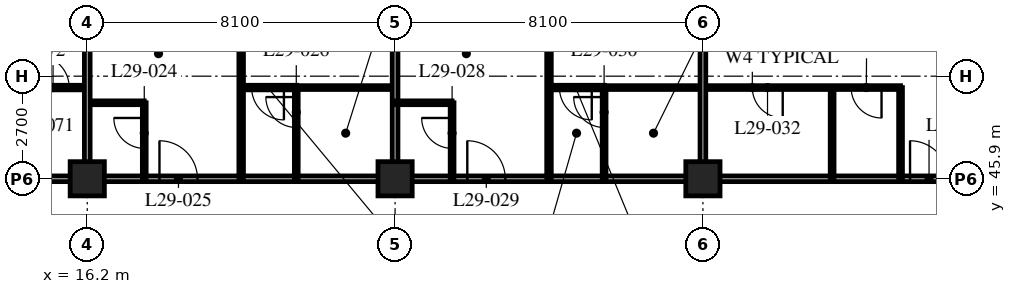
"""IFC4 building model, lengths in metres.
Left out: names, types, materials, properties, quantities, classifications, styles, units other than length and angle.
Written with IfcOpenShell. Run it as: python <this file> out.ifc"""

import sys

from ifc_helpers import new_model, si_unit, direction, frame, frame_2d, origin, origin_2d, place, context, subcontext, project, spatial, rectangle, hollow_rectangle, extrude, element, fill, save


model = new_model("IFC4")
c1 = context("Model", 3, precision=1e-05, world=origin(), true_north=direction((0.0, 1.0)))
c2 = subcontext(c1, "Body", "Model", "MODEL_VIEW")
j1 = project(units=[si_unit("LENGTHUNIT", "METRE"), si_unit("PLANEANGLEUNIT", "RADIAN")], contexts=[c1])
p1 = place(None, origin())
s1 = spatial("IfcSite", under=j1, at=p1, CompositionType="ELEMENT")
p2 = place(p1, origin())
s2 = spatial("IfcBuilding", under=s1, at=p2, CompositionType="ELEMENT")
p3 = place(p2, frame((0.0, 0.0, 117.0)))
s3 = spatial("IfcBuildingStorey", under=s2, at=p3, CompositionType="ELEMENT", Elevation=117.0)
for number, where, z_axis, x_axis in (
    (1, (16.2, 45.9, 0.0), (0.0, 0.0, 1.0), (1.0, 0.0, 0.0)),
    (2, (24.3, 45.9, 0.0), (0.0, 0.0, 1.0), (1.0, 0.0, 0.0)),
    (3, (32.4, 45.9, 0.0), (0.0, 0.0, 1.0), (1.0, 0.0, 0.0)),
):
    element("IfcColumn", number, at=place(p3, frame(where, z_axis=z_axis, x_axis=x_axis)), inside=s3, PredefinedType="COLUMN", context=c2, shape_type="SweptSolid", body=[
        extrude(hollow_rectangle(XDim=0.9, YDim=0.9, WallThickness=0.09, at=origin_2d()), origin(), (0.0, 0.0, 1.0), 3.4),
    ])
p4 = place(p3, frame((12.15, 45.9, 0.0), z_axis=(0.0, 0.0, 1.0), x_axis=(1.0, 0.0, 0.0)))
e4 = element("IfcWall", 4, at=p4, inside=s3, PredefinedType="PARTITIONING", context=c2, shape_type="SweptSolid", body=[
    extrude(rectangle(XDim=32.4, YDim=0.15, at=frame_2d((16.2, 0.0))), origin(), (0.0, 0.0, 1.0), 2.578),
])
p5 = place(p4, frame((5.95, 0.0, 0.0)))
e5 = element("IfcOpeningElement", 5, at=p5, cuts=e4, PredefinedType="OPENING", context=c2, shape_type="SweptSolid", body=[
    extrude(rectangle(XDim=1.0, YDim=2.1, at=frame_2d((0.5, 1.05))), frame((0.0, 0.085, 0.0), z_axis=(0.0, -1.0, 0.0), x_axis=(1.0, 0.0, 0.0)), (0.0, 0.0, 1.0), 0.17),
])
p6 = place(p4, frame((14.05, 0.0, 0.0)))
e6 = element("IfcOpeningElement", 6, at=p6, cuts=e4, PredefinedType="OPENING", context=c2, shape_type="SweptSolid", body=[
    extrude(rectangle(XDim=1.0, YDim=2.1, at=frame_2d((0.5, 1.05))), frame((0.0, 0.085, 0.0), z_axis=(0.0, -1.0, 0.0), x_axis=(1.0, 0.0, 0.0)), (0.0, 0.0, 1.0), 0.17),
])
p7 = place(p4, frame((25.7, 0.0, 0.0)))
e7 = element("IfcOpeningElement", 7, at=p7, cuts=e4, PredefinedType="OPENING", context=c2, shape_type="SweptSolid", body=[
    extrude(rectangle(XDim=1.0, YDim=2.1, at=frame_2d((0.5, 1.05))), frame((0.0, 0.085, 0.0), z_axis=(0.0, -1.0, 0.0), x_axis=(1.0, 0.0, 0.0)), (0.0, 0.0, 1.0), 0.17),
])
p8 = place(p4, frame((29.875, 0.0, 0.0)))
e8 = element("IfcOpeningElement", 8, at=p8, cuts=e4, PredefinedType="OPENING", context=c2, shape_type="SweptSolid", body=[
    extrude(rectangle(XDim=1.0, YDim=2.1, at=frame_2d((0.5, 1.05))), frame((0.0, 0.085, 0.0), z_axis=(0.0, -1.0, 0.0), x_axis=(1.0, 0.0, 0.0)), (0.0, 0.0, 1.0), 0.17),
])
p9 = place(p4, frame((1.525, 0.0, 0.0)))
e9 = element("IfcOpeningElement", 9, at=p9, cuts=e4, PredefinedType="OPENING", context=c2, shape_type="SweptSolid", body=[
    extrude(rectangle(XDim=1.0, YDim=2.1, at=frame_2d((0.5, 1.05))), frame((0.0, 0.085, 0.0), z_axis=(0.0, -1.0, 0.0), x_axis=(1.0, 0.0, 0.0)), (0.0, 0.0, 1.0), 0.17),
])
p10 = place(p3, frame((16.2, 47.9, 0.0), z_axis=(0.0, 0.0, 1.0), x_axis=(1.0, 0.0, 0.0)))
e10 = element("IfcWall", 10, at=p10, inside=s3, PredefinedType="PARTITIONING", context=c2, shape_type="SweptSolid", body=[
    extrude(rectangle(XDim=1.5, YDim=0.1, at=frame_2d((0.75, 0.0))), origin(), (0.0, 0.0, 1.0), 3.19),
])
p11 = place(p3, frame((17.7, 45.9, 0.0), z_axis=(0.0, 0.0, 1.0), x_axis=(0.0, 1.0, 0.0)))
e11 = element("IfcWall", 11, at=p11, inside=s3, PredefinedType="PARTITIONING", context=c2, shape_type="SweptSolid", body=[
    extrude(rectangle(XDim=2.0, YDim=0.1, at=frame_2d((1.0, 0.0))), origin(), (0.0, 0.0, 1.0), 3.19),
])
p12 = place(p11, frame((0.8, 0.0, 0.0)))
e12 = element("IfcOpeningElement", 12, at=p12, cuts=e11, PredefinedType="OPENING", context=c2, shape_type="SweptSolid", body=[
    extrude(rectangle(XDim=0.8, YDim=2.1, at=frame_2d((0.4, 1.05))), frame((0.0, 0.06, 0.0), z_axis=(0.0, -1.0, 0.0), x_axis=(1.0, 0.0, 0.0)), (0.0, 0.0, 1.0), 0.12),
])
p13 = place(p3, frame((21.7, 48.3, 0.0), z_axis=(0.0, 0.0, 1.0), x_axis=(1.0, 0.0, 0.0)))
e13 = element("IfcWall", 13, at=p13, inside=s3, PredefinedType="PARTITIONING", context=c2, shape_type="SweptSolid", body=[
    extrude(rectangle(XDim=2.6, YDim=0.1, at=frame_2d((1.3, 0.0))), origin(), (0.0, 0.0, 1.0), 3.19),
])
p14 = place(p3, frame((21.7, 45.9, 0.0), z_axis=(0.0, 0.0, 1.0), x_axis=(0.0, 1.0, 0.0)))
e14 = element("IfcWall", 14, at=p14, inside=s3, PredefinedType="PARTITIONING", context=c2, shape_type="SweptSolid", body=[
    extrude(rectangle(XDim=2.4, YDim=0.1, at=frame_2d((1.2, 0.0))), origin(), (0.0, 0.0, 1.0), 3.19),
])
p15 = place(p14, frame((1.35, 0.0, 0.0)))
e15 = element("IfcOpeningElement", 15, at=p15, cuts=e14, PredefinedType="OPENING", context=c2, shape_type="SweptSolid", body=[
    extrude(rectangle(XDim=0.8, YDim=2.1, at=frame_2d((0.4, 1.05))), frame((0.0, 0.06, 0.0), z_axis=(0.0, -1.0, 0.0), x_axis=(1.0, 0.0, 0.0)), (0.0, 0.0, 1.0), 0.12),
])
p16 = place(p3, frame((20.25, 45.9, 0.0), z_axis=(0.0, 0.0, 1.0), x_axis=(0.0, 1.0, 0.0)))
e16 = element("IfcWall", 16, at=p16, inside=s3, PredefinedType="PARTITIONING", context=c2, shape_type="SweptSolid", body=[
    extrude(rectangle(XDim=7.8, YDim=0.12, at=frame_2d((3.9, 0.0))), origin(), (0.0, 0.0, 1.0), 3.19),
])
p17 = place(p16, frame((4.825, 0.0, 0.0)))
e17 = element("IfcOpeningElement", 17, at=p17, cuts=e16, PredefinedType="OPENING", context=c2, shape_type="SweptSolid", body=[
    extrude(rectangle(XDim=0.85, YDim=2.1, at=frame_2d((0.425, 1.05))), frame((0.0, 0.07, 0.0), z_axis=(0.0, -1.0, 0.0), x_axis=(1.0, 0.0, 0.0)), (0.0, 0.0, 1.0), 0.14),
])
p18 = place(p3, frame((24.3, 45.9, 0.0), z_axis=(0.0, 0.0, 1.0), x_axis=(0.0, 1.0, 0.0)))
e18 = element("IfcWall", 18, at=p18, inside=s3, PredefinedType="PARTITIONING", context=c2, shape_type="SweptSolid", body=[
    extrude(rectangle(XDim=7.8, YDim=0.15, at=frame_2d((3.9, 0.0))), origin(), (0.0, 0.0, 1.0), 2.578),
])
p19 = place(p3, frame((24.3, 47.9, 0.0), z_axis=(0.0, 0.0, 1.0), x_axis=(1.0, 0.0, 0.0)))
e19 = element("IfcWall", 19, at=p19, inside=s3, PredefinedType="PARTITIONING", context=c2, shape_type="SweptSolid", body=[
    extrude(rectangle(XDim=1.5, YDim=0.1, at=frame_2d((0.75, 0.0))), origin(), (0.0, 0.0, 1.0), 3.19),
])
p20 = place(p3, frame((25.8, 45.9, 0.0), z_axis=(0.0, 0.0, 1.0), x_axis=(0.0, 1.0, 0.0)))
e20 = element("IfcWall", 20, at=p20, inside=s3, PredefinedType="PARTITIONING", context=c2, shape_type="SweptSolid", body=[
    extrude(rectangle(XDim=2.0, YDim=0.1, at=frame_2d((1.0, 0.0))), origin(), (0.0, 0.0, 1.0), 3.19),
])
p21 = place(p20, frame((0.8, 0.0, 0.0)))
e21 = element("IfcOpeningElement", 21, at=p21, cuts=e20, PredefinedType="OPENING", context=c2, shape_type="SweptSolid", body=[
    extrude(rectangle(XDim=0.8, YDim=2.1, at=frame_2d((0.4, 1.05))), frame((0.0, 0.06, 0.0), z_axis=(0.0, -1.0, 0.0), x_axis=(1.0, 0.0, 0.0)), (0.0, 0.0, 1.0), 0.12),
])
p22 = place(p3, frame((29.8, 48.3, 0.0), z_axis=(0.0, 0.0, 1.0), x_axis=(1.0, 0.0, 0.0)))
e22 = element("IfcWall", 22, at=p22, inside=s3, PredefinedType="PARTITIONING", context=c2, shape_type="SweptSolid", body=[
    extrude(rectangle(XDim=7.8, YDim=0.1, at=frame_2d((3.9, 0.0))), origin(), (0.0, 0.0, 1.0), 3.19),
])
p23 = place(p22, frame((3.9, 0.0, 0.0)))
e23 = element("IfcOpeningElement", 23, at=p23, cuts=e22, PredefinedType="OPENING", context=c2, shape_type="SweptSolid", body=[
    extrude(rectangle(XDim=0.8, YDim=2.1, at=frame_2d((0.4, 1.05))), frame((0.0, 0.06, 0.0), z_axis=(0.0, -1.0, 0.0), x_axis=(1.0, 0.0, 0.0)), (0.0, 0.0, 1.0), 0.12),
])
p24 = place(p22, frame((6.5, 0.0, 0.0)))
e24 = element("IfcOpeningElement", 24, at=p24, cuts=e22, PredefinedType="OPENING", context=c2, shape_type="SweptSolid", body=[
    extrude(rectangle(XDim=0.8, YDim=2.1, at=frame_2d((0.4, 1.05))), frame((0.0, 0.06, 0.0), z_axis=(0.0, -1.0, 0.0), x_axis=(1.0, 0.0, 0.0)), (0.0, 0.0, 1.0), 0.12),
])
p25 = place(p3, frame((29.8, 45.9, 0.0), z_axis=(0.0, 0.0, 1.0), x_axis=(0.0, 1.0, 0.0)))
e25 = element("IfcWall", 25, at=p25, inside=s3, PredefinedType="PARTITIONING", context=c2, shape_type="SweptSolid", body=[
    extrude(rectangle(XDim=2.4, YDim=0.1, at=frame_2d((1.2, 0.0))), origin(), (0.0, 0.0, 1.0), 3.19),
])
p26 = place(p25, frame((1.35, 0.0, 0.0)))
e26 = element("IfcOpeningElement", 26, at=p26, cuts=e25, PredefinedType="OPENING", context=c2, shape_type="SweptSolid", body=[
    extrude(rectangle(XDim=0.8, YDim=2.1, at=frame_2d((0.4, 1.05))), frame((0.0, 0.06, 0.0), z_axis=(0.0, -1.0, 0.0), x_axis=(1.0, 0.0, 0.0)), (0.0, 0.0, 1.0), 0.12),
])
p27 = place(p3, frame((28.35, 45.9, 0.0), z_axis=(0.0, 0.0, 1.0), x_axis=(0.0, 1.0, 0.0)))
e27 = element("IfcWall", 27, at=p27, inside=s3, PredefinedType="PARTITIONING", context=c2, shape_type="SweptSolid", body=[
    extrude(rectangle(XDim=7.8, YDim=0.12, at=frame_2d((3.9, 0.0))), origin(), (0.0, 0.0, 1.0), 3.19),
])
p28 = place(p27, frame((4.825, 0.0, 0.0)))
e28 = element("IfcOpeningElement", 28, at=p28, cuts=e27, PredefinedType="OPENING", context=c2, shape_type="SweptSolid", body=[
    extrude(rectangle(XDim=0.85, YDim=2.1, at=frame_2d((0.425, 1.05))), frame((0.0, 0.07, 0.0), z_axis=(0.0, -1.0, 0.0), x_axis=(1.0, 0.0, 0.0)), (0.0, 0.0, 1.0), 0.14),
])
p29 = place(p3, frame((32.4, 45.9, 0.0), z_axis=(0.0, 0.0, 1.0), x_axis=(0.0, 1.0, 0.0)))
e29 = element("IfcWall", 29, at=p29, inside=s3, PredefinedType="PARTITIONING", context=c2, shape_type="SweptSolid", body=[
    extrude(rectangle(XDim=7.8, YDim=0.15, at=frame_2d((3.9, 0.0))), origin(), (0.0, 0.0, 1.0), 2.578),
])
for number, where, z_axis, x_axis in (
    (30, (35.8, 45.9, 0.0), (0.0, 0.0, 1.0), (0.0, 1.0, 0.0)),
    (31, (37.6, 45.9, 0.0), (0.0, 0.0, 1.0), (0.0, 1.0, 0.0)),
):
    element("IfcWall", number, at=place(p3, frame(where, z_axis=z_axis, x_axis=x_axis)), inside=s3, PredefinedType="PARTITIONING", context=c2, shape_type="SweptSolid", body=[
        extrude(rectangle(XDim=2.4, YDim=0.1, at=frame_2d((1.2, 0.0))), origin(), (0.0, 0.0, 1.0), 3.19),
    ])
p30 = place(p3, frame((8.15, 48.3, 0.0), z_axis=(0.0, 0.0, 1.0), x_axis=(1.0, 0.0, 0.0)))
e32 = element("IfcWall", 32, at=p30, inside=s3, PredefinedType="PARTITIONING", context=c2, shape_type="SweptSolid", body=[
    extrude(rectangle(XDim=8.05, YDim=0.12, at=frame_2d((4.025, 0.0))), origin(), (0.0, 0.0, 1.0), 3.19),
])
p31 = place(p30, frame((6.725, 0.0, 0.0)))
e33 = element("IfcOpeningElement", 33, at=p31, cuts=e32, PredefinedType="OPENING", context=c2, shape_type="SweptSolid", body=[
    extrude(rectangle(XDim=0.85, YDim=2.1, at=frame_2d((0.425, 1.05))), frame((0.0, 0.07, 0.0), z_axis=(0.0, -1.0, 0.0), x_axis=(1.0, 0.0, 0.0)), (0.0, 0.0, 1.0), 0.14),
])
p32 = place(p30, frame((2.875, 0.0, 0.0)))
e34 = element("IfcOpeningElement", 34, at=p32, cuts=e32, PredefinedType="OPENING", context=c2, shape_type="SweptSolid", body=[
    extrude(rectangle(XDim=0.85, YDim=2.1, at=frame_2d((0.425, 1.05))), frame((0.0, 0.07, 0.0), z_axis=(0.0, -1.0, 0.0), x_axis=(1.0, 0.0, 0.0)), (0.0, 0.0, 1.0), 0.14),
])
p33 = place(p3, frame((16.2, 45.9, 0.0), z_axis=(0.0, 0.0, 1.0), x_axis=(0.0, 1.0, 0.0)))
e35 = element("IfcWall", 35, at=p33, inside=s3, PredefinedType="PARTITIONING", context=c2, shape_type="SweptSolid", body=[
    extrude(rectangle(XDim=7.8, YDim=0.15, at=frame_2d((3.9, 0.0))), origin(), (0.0, 0.0, 1.0), 2.578),
])
p34 = place(p3, frame((20.25, 48.3, 0.0), z_axis=(0.0, 0.0, 1.0), x_axis=(1.0, 0.0, 0.0)))
e36 = element("IfcWall", 36, at=p34, inside=s3, PredefinedType="PARTITIONING", context=c2, shape_type="SweptSolid", body=[
    extrude(rectangle(XDim=1.46, YDim=0.12, at=frame_2d((0.73, 0.0))), origin(), (0.0, 0.0, 1.0), 3.19),
])
p35 = place(p34, frame((0.275, 0.0, 0.0)))
e37 = element("IfcOpeningElement", 37, at=p35, cuts=e36, PredefinedType="OPENING", context=c2, shape_type="SweptSolid", body=[
    extrude(rectangle(XDim=0.85, YDim=2.1, at=frame_2d((0.425, 1.05))), frame((0.0, 0.07, 0.0), z_axis=(0.0, -1.0, 0.0), x_axis=(1.0, 0.0, 0.0)), (0.0, 0.0, 1.0), 0.14),
])
p36 = place(p3, frame((28.35, 48.3, 0.0), z_axis=(0.0, 0.0, 1.0), x_axis=(1.0, 0.0, 0.0)))
e38 = element("IfcWall", 38, at=p36, inside=s3, PredefinedType="PARTITIONING", context=c2, shape_type="SweptSolid", body=[
    extrude(rectangle(XDim=1.46, YDim=0.12, at=frame_2d((0.73, 0.0))), origin(), (0.0, 0.0, 1.0), 3.19),
])
p37 = place(p36, frame((0.275, 0.0, 0.0)))
e39 = element("IfcOpeningElement", 39, at=p37, cuts=e38, PredefinedType="OPENING", context=c2, shape_type="SweptSolid", body=[
    extrude(rectangle(XDim=0.85, YDim=2.1, at=frame_2d((0.425, 1.05))), frame((0.0, 0.07, 0.0), z_axis=(0.0, -1.0, 0.0), x_axis=(1.0, 0.0, 0.0)), (0.0, 0.0, 1.0), 0.14),
])
p38 = place(p12, origin())
e40 = element("IfcDoor", 40, at=p38, inside=s3, OperationType="SINGLE_SWING_RIGHT", PredefinedType="DOOR", context=c2, shape_type="SweptSolid", body=[
    extrude(rectangle(XDim=0.8, YDim=2.1, at=frame_2d((0.4, 1.05))), frame((0.0, 0.025, 0.0), z_axis=(0.0, -1.0, 0.0), x_axis=(1.0, 0.0, 0.0)), (0.0, 0.0, 1.0), 0.05),
])
fill(e12, e40)
p39 = place(p5, origin())
e41 = element("IfcDoor", 41, at=p39, inside=s3, OperationType="SINGLE_SWING_LEFT", PredefinedType="DOOR", context=c2, shape_type="SweptSolid", body=[
    extrude(rectangle(XDim=1.0, YDim=2.1, at=frame_2d((0.5, 1.05))), frame((0.0, 0.025, 0.0), z_axis=(0.0, -1.0, 0.0), x_axis=(1.0, 0.0, 0.0)), (0.0, 0.0, 1.0), 0.05),
])
fill(e5, e41)
p40 = place(p15, origin())
e42 = element("IfcDoor", 42, at=p40, inside=s3, OperationType="SINGLE_SWING_RIGHT", PredefinedType="DOOR", context=c2, shape_type="SweptSolid", body=[
    extrude(rectangle(XDim=0.8, YDim=2.1, at=frame_2d((0.4, 1.05))), frame((0.0, 0.025, 0.0), z_axis=(0.0, -1.0, 0.0), x_axis=(1.0, 0.0, 0.0)), (0.0, 0.0, 1.0), 0.05),
])
fill(e15, e42)
p41 = place(p21, origin())
e43 = element("IfcDoor", 43, at=p41, inside=s3, OperationType="SINGLE_SWING_RIGHT", PredefinedType="DOOR", context=c2, shape_type="SweptSolid", body=[
    extrude(rectangle(XDim=0.8, YDim=2.1, at=frame_2d((0.4, 1.05))), frame((0.0, 0.025, 0.0), z_axis=(0.0, -1.0, 0.0), x_axis=(1.0, 0.0, 0.0)), (0.0, 0.0, 1.0), 0.05),
])
fill(e21, e43)
p42 = place(p6, origin())
e44 = element("IfcDoor", 44, at=p42, inside=s3, OperationType="SINGLE_SWING_LEFT", PredefinedType="DOOR", context=c2, shape_type="SweptSolid", body=[
    extrude(rectangle(XDim=1.0, YDim=2.1, at=frame_2d((0.5, 1.05))), frame((0.0, 0.025, 0.0), z_axis=(0.0, -1.0, 0.0), x_axis=(1.0, 0.0, 0.0)), (0.0, 0.0, 1.0), 0.05),
])
fill(e6, e44)
p43 = place(p26, origin())
e45 = element("IfcDoor", 45, at=p43, inside=s3, OperationType="SINGLE_SWING_RIGHT", PredefinedType="DOOR", context=c2, shape_type="SweptSolid", body=[
    extrude(rectangle(XDim=0.8, YDim=2.1, at=frame_2d((0.4, 1.05))), frame((0.0, 0.025, 0.0), z_axis=(0.0, -1.0, 0.0), x_axis=(1.0, 0.0, 0.0)), (0.0, 0.0, 1.0), 0.05),
])
fill(e26, e45)
p44 = place(p23, origin())
e46 = element("IfcDoor", 46, at=p44, inside=s3, OperationType="SINGLE_SWING_LEFT", PredefinedType="DOOR", context=c2, shape_type="SweptSolid", body=[
    extrude(rectangle(XDim=0.8, YDim=2.1, at=frame_2d((0.4, 1.05))), frame((0.0, 0.025, 0.0), z_axis=(0.0, -1.0, 0.0), x_axis=(1.0, 0.0, 0.0)), (0.0, 0.0, 1.0), 0.05),
])
fill(e23, e46)
p45 = place(p24, origin())
e47 = element("IfcDoor", 47, at=p45, inside=s3, OperationType="SINGLE_SWING_LEFT", PredefinedType="DOOR", context=c2, shape_type="SweptSolid", body=[
    extrude(rectangle(XDim=0.8, YDim=2.1, at=frame_2d((0.4, 1.05))), frame((0.0, 0.025, 0.0), z_axis=(0.0, -1.0, 0.0), x_axis=(1.0, 0.0, 0.0)), (0.0, 0.0, 1.0), 0.05),
])
fill(e24, e47)
p46 = place(p7, origin())
e48 = element("IfcDoor", 48, at=p46, inside=s3, OperationType="SINGLE_SWING_LEFT", PredefinedType="DOOR", context=c2, shape_type="SweptSolid", body=[
    extrude(rectangle(XDim=1.0, YDim=2.1, at=frame_2d((0.5, 1.05))), frame((0.0, 0.025, 0.0), z_axis=(0.0, -1.0, 0.0), x_axis=(1.0, 0.0, 0.0)), (0.0, 0.0, 1.0), 0.05),
])
fill(e7, e48)
p47 = place(p31, origin())
e49 = element("IfcDoor", 49, at=p47, inside=s3, OperationType="SINGLE_SWING_LEFT", PredefinedType="DOOR", context=c2, shape_type="SweptSolid", body=[
    extrude(rectangle(XDim=0.85, YDim=2.1, at=frame_2d((0.425, 1.05))), frame((0.0, 0.025, 0.0), z_axis=(0.0, -1.0, 0.0), x_axis=(1.0, 0.0, 0.0)), (0.0, 0.0, 1.0), 0.05),
])
fill(e33, e49)
p48 = place(p35, origin())
e50 = element("IfcDoor", 50, at=p48, inside=s3, OperationType="SINGLE_SWING_LEFT", PredefinedType="DOOR", context=c2, shape_type="SweptSolid", body=[
    extrude(rectangle(XDim=0.85, YDim=2.1, at=frame_2d((0.425, 1.05))), frame((0.0, 0.025, 0.0), z_axis=(0.0, -1.0, 0.0), x_axis=(1.0, 0.0, 0.0)), (0.0, 0.0, 1.0), 0.05),
])
fill(e37, e50)
p49 = place(p37, origin())
e51 = element("IfcDoor", 51, at=p49, inside=s3, OperationType="SINGLE_SWING_LEFT", PredefinedType="DOOR", context=c2, shape_type="SweptSolid", body=[
    extrude(rectangle(XDim=0.85, YDim=2.1, at=frame_2d((0.425, 1.05))), frame((0.0, 0.025, 0.0), z_axis=(0.0, -1.0, 0.0), x_axis=(1.0, 0.0, 0.0)), (0.0, 0.0, 1.0), 0.05),
])
fill(e39, e51)
save(model, sys.argv[1])
